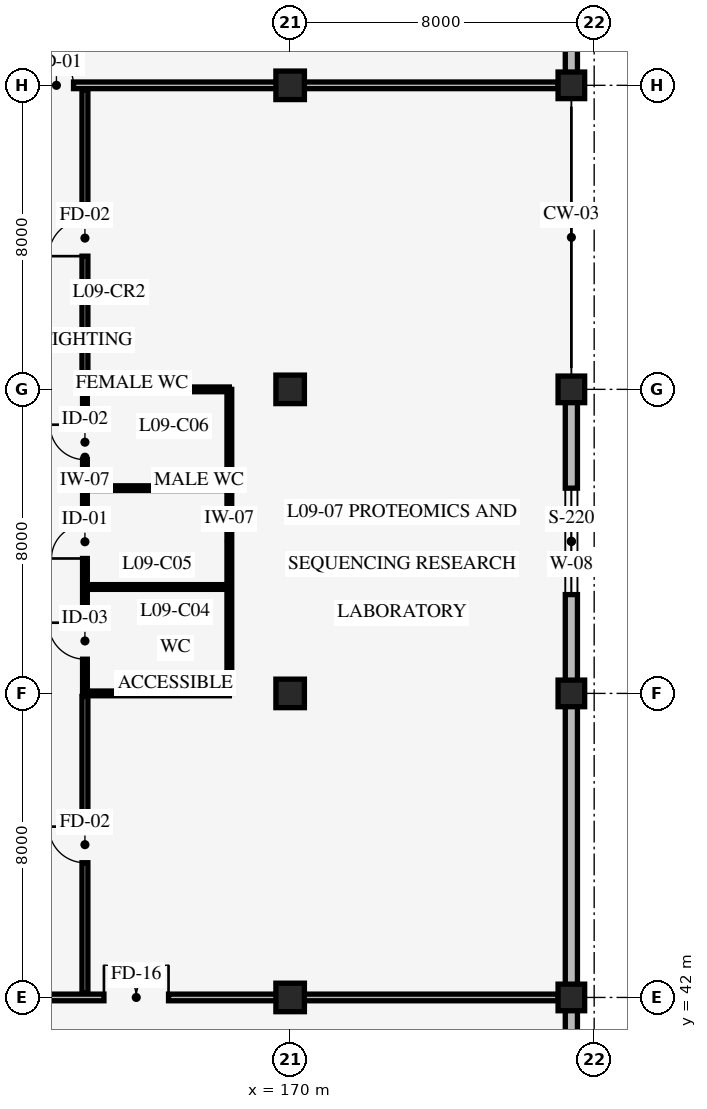
"""IFC4 building model, lengths in metres.
Left out: names, types, materials, properties, quantities, classifications, styles, units other than length and angle.
Written with IfcOpenShell. Run it as: python <this file> out.ifc"""

import sys

from ifc_helpers import new_model, si_unit, direction, frame, frame_2d, origin, origin_2d, place, context, subcontext, project, spatial, rectangle, extrude, element, fill, save


model = new_model("IFC4")
c1 = context("Model", 3, precision=1e-05, world=origin(), true_north=direction((0.0, 1.0)))
c2 = subcontext(c1, "Body", "Model", "MODEL_VIEW")
j1 = project(units=[si_unit("LENGTHUNIT", "METRE"), si_unit("PLANEANGLEUNIT", "RADIAN")], contexts=[c1])
p1 = place(None, origin())
s1 = spatial("IfcSite", under=j1, at=p1, CompositionType="ELEMENT")
p2 = place(p1, origin())
s2 = spatial("IfcBuilding", under=s1, at=p2, CompositionType="ELEMENT")
p3 = place(p2, frame((0.0, 0.0, 36.0)))
s3 = spatial("IfcBuildingStorey", under=s2, at=p3, CompositionType="ELEMENT", Elevation=36.0)
for number, where, z_axis, x_axis in (
    (1, (170.0, 42.0, 0.0), (0.0, 0.0, 1.0), (1.0, 0.0, 0.0)),
    (2, (170.0, 50.0, 0.0), (0.0, 0.0, 1.0), (1.0, 0.0, 0.0)),
    (3, (170.0, 58.0, 0.0), (0.0, 0.0, 1.0), (1.0, 0.0, 0.0)),
    (4, (170.0, 66.0, 0.0), (0.0, 0.0, 1.0), (1.0, 0.0, 0.0)),
):
    element("IfcColumn", number, at=place(p3, frame(where, z_axis=z_axis, x_axis=x_axis)), inside=s3, PredefinedType="COLUMN", context=c2, shape_type="SweptSolid", body=[
        extrude(rectangle(XDim=0.75, YDim=0.75, at=origin_2d()), origin(), (0.0, 0.0, 1.0), 4.2),
    ])
for number, where, z_axis, x_axis in (
    (5, (177.4, 42.0, 0.0), (0.0, 0.0, 1.0), (1.0, 0.0, 0.0)),
    (6, (177.4, 50.0, 0.0), (0.0, 0.0, 1.0), (1.0, 0.0, 0.0)),
    (7, (177.4, 58.0, 0.0), (0.0, 0.0, 1.0), (1.0, 0.0, 0.0)),
    (8, (177.4, 66.0, 0.0), (0.0, 0.0, 1.0), (1.0, 0.0, 0.0)),
):
    element("IfcColumn", number, at=place(p3, frame(where, z_axis=z_axis, x_axis=x_axis)), inside=s3, PredefinedType="COLUMN", context=c2, shape_type="SweptSolid", body=[
        extrude(rectangle(XDim=0.7, YDim=0.7, at=origin_2d()), origin(), (0.0, 0.0, 1.0), 4.2),
    ])
p4 = place(p3, frame((177.4, 74.0, 0.0), z_axis=(0.0, 0.0, 1.0), x_axis=(0.0, -1.0, 0.0)))
e9 = element("IfcWall", 9, at=p4, inside=s3, PredefinedType="STANDARD", context=c2, shape_type="SweptSolid", body=[
    extrude(rectangle(XDim=8.0, YDim=0.32, at=frame_2d((4.0, 0.0))), origin(), (0.0, 0.0, 1.0), 3.14),
])
p5 = place(p4, frame((2.5, 0.0, 0.85)))
e10 = element("IfcOpeningElement", 10, at=p5, cuts=e9, PredefinedType="OPENING", context=c2, shape_type="SweptSolid", body=[
    extrude(rectangle(XDim=3.0, YDim=1.8, at=frame_2d((1.5, 0.9))), frame((0.0, 0.17, 0.0), z_axis=(0.0, -1.0, 0.0), x_axis=(1.0, 0.0, 0.0)), (0.0, 0.0, 1.0), 0.34),
])
p6 = place(p3, frame((177.4, 58.0, 0.0), z_axis=(0.0, 0.0, 1.0), x_axis=(0.0, -1.0, 0.0)))
e11 = element("IfcWall", 11, at=p6, inside=s3, PredefinedType="STANDARD", context=c2, shape_type="SweptSolid", body=[
    extrude(rectangle(XDim=8.0, YDim=0.32, at=frame_2d((4.0, 0.0))), origin(), (0.0, 0.0, 1.0), 3.14),
])
p7 = place(p6, frame((2.6, 0.0, 0.85)))
e12 = element("IfcOpeningElement", 12, at=p7, cuts=e11, PredefinedType="OPENING", context=c2, shape_type="SweptSolid", body=[
    extrude(rectangle(XDim=2.8, YDim=1.6, at=frame_2d((1.4, 0.8))), frame((0.0, 0.17, 0.0), z_axis=(0.0, -1.0, 0.0), x_axis=(1.0, 0.0, 0.0)), (0.0, 0.0, 1.0), 0.34),
])
p8 = place(p3, frame((177.4, 50.0, 0.0), z_axis=(0.0, 0.0, 1.0), x_axis=(0.0, -1.0, 0.0)))
e13 = element("IfcWall", 13, at=p8, inside=s3, PredefinedType="STANDARD", context=c2, shape_type="SweptSolid", body=[
    extrude(rectangle(XDim=8.0, YDim=0.32, at=frame_2d((4.0, 0.0))), origin(), (0.0, 0.0, 1.0), 3.14),
])
p9 = place(p3, frame((177.4, 42.0, 0.0), z_axis=(0.0, 0.0, 1.0), x_axis=(0.0, -1.0, 0.0)))
e14 = element("IfcWall", 14, at=p9, inside=s3, PredefinedType="STANDARD", context=c2, shape_type="SweptSolid", body=[
    extrude(rectangle(XDim=8.0, YDim=0.32, at=frame_2d((4.0, 0.0))), origin(), (0.0, 0.0, 1.0), 3.14),
])
p10 = place(p9, frame((2.7, 0.0, 0.85)))
e15 = element("IfcOpeningElement", 15, at=p10, cuts=e14, PredefinedType="OPENING", context=c2, shape_type="SweptSolid", body=[
    extrude(rectangle(XDim=2.6, YDim=1.5, at=frame_2d((1.3, 0.75))), frame((0.0, 0.17, 0.0), z_axis=(0.0, -1.0, 0.0), x_axis=(1.0, 0.0, 0.0)), (0.0, 0.0, 1.0), 0.34),
])
p11 = place(p3, frame((164.6, 50.0, 0.0), z_axis=(0.0, 0.0, 1.0), x_axis=(0.0, 1.0, 0.0)))
e16 = element("IfcWall", 16, at=p11, inside=s3, PredefinedType="STANDARD", context=c2, shape_type="SweptSolid", body=[
    extrude(rectangle(XDim=8.0, YDim=0.125, at=frame_2d((4.0, 0.0))), origin(), (0.0, 0.0, 1.0), 3.9),
])
p12 = place(p11, frame((0.9, 0.0, 0.0)))
e17 = element("IfcOpeningElement", 17, at=p12, cuts=e16, PredefinedType="OPENING", context=c2, shape_type="SweptSolid", body=[
    extrude(rectangle(XDim=0.96, YDim=2.08, at=frame_2d((0.48, 1.04))), frame((0.0, 0.073, 0.0), z_axis=(0.0, -1.0, 0.0), x_axis=(1.0, 0.0, 0.0)), (0.0, 0.0, 1.0), 0.145),
])
p13 = place(p11, frame((3.55, 0.0, 0.0)))
e18 = element("IfcOpeningElement", 18, at=p13, cuts=e16, PredefinedType="OPENING", context=c2, shape_type="SweptSolid", body=[
    extrude(rectangle(XDim=0.88, YDim=2.05, at=frame_2d((0.44, 1.025))), frame((0.0, 0.073, 0.0), z_axis=(0.0, -1.0, 0.0), x_axis=(1.0, 0.0, 0.0)), (0.0, 0.0, 1.0), 0.145),
])
p14 = place(p11, frame((6.15, 0.0, 0.0)))
e19 = element("IfcOpeningElement", 19, at=p14, cuts=e16, PredefinedType="OPENING", context=c2, shape_type="SweptSolid", body=[
    extrude(rectangle(XDim=0.92, YDim=2.05, at=frame_2d((0.46, 1.025))), frame((0.0, 0.073, 0.0), z_axis=(0.0, -1.0, 0.0), x_axis=(1.0, 0.0, 0.0)), (0.0, 0.0, 1.0), 0.145),
])
p15 = place(p3, frame((168.4, 50.0, 0.0), z_axis=(0.0, 0.0, 1.0), x_axis=(0.0, 1.0, 0.0)))
e20 = element("IfcWall", 20, at=p15, inside=s3, PredefinedType="STANDARD", context=c2, shape_type="SweptSolid", body=[
    extrude(rectangle(XDim=8.0, YDim=0.125, at=frame_2d((4.0, 0.0))), origin(), (0.0, 0.0, 1.0), 3.9),
])
p16 = place(p3, frame((164.6, 50.0, 0.0), z_axis=(0.0, 0.0, 1.0), x_axis=(1.0, 0.0, 0.0)))
e21 = element("IfcWall", 21, at=p16, inside=s3, PredefinedType="STANDARD", context=c2, shape_type="SweptSolid", body=[
    extrude(rectangle(XDim=3.8, YDim=0.125, at=frame_2d((1.9, 0.0))), origin(), (0.0, 0.0, 1.0), 3.09),
])
for number, where, z_axis, x_axis in (
    (22, (164.6, 52.8, 0.0), (0.0, 0.0, 1.0), (1.0, 0.0, 0.0)),
    (23, (164.6, 55.4, 0.0), (0.0, 0.0, 1.0), (1.0, 0.0, 0.0)),
):
    element("IfcWall", number, at=place(p3, frame(where, z_axis=z_axis, x_axis=x_axis)), inside=s3, PredefinedType="STANDARD", context=c2, shape_type="SweptSolid", body=[
        extrude(rectangle(XDim=3.8, YDim=0.125, at=frame_2d((1.9, 0.0))), origin(), (0.0, 0.0, 1.0), 3.9),
    ])
p17 = place(p3, frame((164.6, 58.0, 0.0), z_axis=(0.0, 0.0, 1.0), x_axis=(1.0, 0.0, 0.0)))
e24 = element("IfcWall", 24, at=p17, inside=s3, PredefinedType="STANDARD", context=c2, shape_type="SweptSolid", body=[
    extrude(rectangle(XDim=3.8, YDim=0.125, at=frame_2d((1.9, 0.0))), origin(), (0.0, 0.0, 1.0), 3.09),
])
p18 = place(p3, frame((164.6, 42.12, 0.0), z_axis=(0.0, 0.0, 1.0), x_axis=(0.0, 1.0, 0.0)))
e25 = element("IfcWall", 25, at=p18, inside=s3, PredefinedType="STANDARD", context=c2, shape_type="SweptSolid", body=[
    extrude(rectangle(XDim=7.8, YDim=0.155, at=frame_2d((3.9, 0.0))), origin(), (0.0, 0.0, 1.0), 3.9),
])
p19 = place(p18, frame((3.425, 0.0, 0.0)))
e26 = element("IfcOpeningElement", 26, at=p19, cuts=e25, PredefinedType="OPENING", context=c2, shape_type="SweptSolid", body=[
    extrude(rectangle(XDim=0.95, YDim=2.1, at=frame_2d((0.475, 1.05))), frame((0.0, 0.087, 0.0), z_axis=(0.0, -1.0, 0.0), x_axis=(1.0, 0.0, 0.0)), (0.0, 0.0, 1.0), 0.175),
])
p20 = place(p3, frame((164.6, 58.08, 0.0), z_axis=(0.0, 0.0, 1.0), x_axis=(0.0, 1.0, 0.0)))
e27 = element("IfcWall", 27, at=p20, inside=s3, PredefinedType="STANDARD", context=c2, shape_type="SweptSolid", body=[
    extrude(rectangle(XDim=7.8, YDim=0.155, at=frame_2d((3.9, 0.0))), origin(), (0.0, 0.0, 1.0), 3.9),
])
p21 = place(p20, frame((3.425, 0.0, 0.0)))
e28 = element("IfcOpeningElement", 28, at=p21, cuts=e27, PredefinedType="OPENING", context=c2, shape_type="SweptSolid", body=[
    extrude(rectangle(XDim=0.95, YDim=2.1, at=frame_2d((0.475, 1.05))), frame((0.0, 0.087, 0.0), z_axis=(0.0, -1.0, 0.0), x_axis=(1.0, 0.0, 0.0)), (0.0, 0.0, 1.0), 0.175),
])
p22 = place(p3, frame((162.35, 42.0, 0.0), z_axis=(0.0, 0.0, 1.0), x_axis=(1.0, 0.0, 0.0)))
e29 = element("IfcWall", 29, at=p22, inside=s3, PredefinedType="STANDARD", context=c2, shape_type="SweptSolid", body=[
    extrude(rectangle(XDim=14.7, YDim=0.175, at=frame_2d((7.35, 0.0))), origin(), (0.0, 0.0, 1.0), 3.09),
])
p23 = place(p22, frame((2.75, 0.0, 0.0)))
e30 = element("IfcOpeningElement", 30, at=p23, cuts=e29, PredefinedType="OPENING", context=c2, shape_type="SweptSolid", body=[
    extrude(rectangle(XDim=1.7, YDim=2.3, at=frame_2d((0.85, 1.15))), frame((0.0, 0.098, 0.0), z_axis=(0.0, -1.0, 0.0), x_axis=(1.0, 0.0, 0.0)), (0.0, 0.0, 1.0), 0.195),
])
p24 = place(p3, frame((162.35, 66.0, 0.0), z_axis=(0.0, 0.0, 1.0), x_axis=(1.0, 0.0, 0.0)))
e31 = element("IfcWall", 31, at=p24, inside=s3, PredefinedType="STANDARD", context=c2, shape_type="SweptSolid", body=[
    extrude(rectangle(XDim=14.7, YDim=0.175, at=frame_2d((7.35, 0.0))), origin(), (0.0, 0.0, 1.0), 3.09),
])
p25 = place(p24, frame((1.05, 0.0, 0.0)))
e32 = element("IfcOpeningElement", 32, at=p25, cuts=e31, PredefinedType="OPENING", context=c2, shape_type="SweptSolid", body=[
    extrude(rectangle(XDim=0.9, YDim=2.1, at=frame_2d((0.45, 1.05))), frame((0.0, 0.098, 0.0), z_axis=(0.0, -1.0, 0.0), x_axis=(1.0, 0.0, 0.0)), (0.0, 0.0, 1.0), 0.195),
])
p26 = place(p7, origin())
e33 = element("IfcWindow", 33, at=p26, inside=s3, PartitioningType="SINGLE_PANEL", PredefinedType="WINDOW", context=c2, shape_type="SweptSolid", body=[
    extrude(rectangle(XDim=2.8, YDim=1.6, at=frame_2d((1.4, 0.8))), frame((0.0, 0.03, 0.0), z_axis=(0.0, -1.0, 0.0), x_axis=(1.0, 0.0, 0.0)), (0.0, 0.0, 1.0), 0.06),
])
fill(e12, e33)
p27 = place(p12, origin())
e34 = element("IfcDoor", 34, at=p27, inside=s3, OperationType="SINGLE_SWING_RIGHT", PredefinedType="DOOR", context=c2, shape_type="SweptSolid", body=[
    extrude(rectangle(XDim=0.96, YDim=2.08, at=frame_2d((0.48, 1.04))), frame((0.0, 0.025, 0.0), z_axis=(0.0, -1.0, 0.0), x_axis=(1.0, 0.0, 0.0)), (0.0, 0.0, 1.0), 0.05),
])
fill(e17, e34)
p28 = place(p13, origin())
e35 = element("IfcDoor", 35, at=p28, inside=s3, OperationType="SINGLE_SWING_LEFT", PredefinedType="DOOR", context=c2, shape_type="SweptSolid", body=[
    extrude(rectangle(XDim=0.88, YDim=2.05, at=frame_2d((0.44, 1.025))), frame((0.0, 0.025, 0.0), z_axis=(0.0, -1.0, 0.0), x_axis=(1.0, 0.0, 0.0)), (0.0, 0.0, 1.0), 0.05),
])
fill(e18, e35)
p29 = place(p14, origin())
e36 = element("IfcDoor", 36, at=p29, inside=s3, OperationType="SINGLE_SWING_RIGHT", PredefinedType="DOOR", context=c2, shape_type="SweptSolid", body=[
    extrude(rectangle(XDim=0.92, YDim=2.05, at=frame_2d((0.46, 1.025))), frame((0.0, 0.025, 0.0), z_axis=(0.0, -1.0, 0.0), x_axis=(1.0, 0.0, 0.0)), (0.0, 0.0, 1.0), 0.05),
])
fill(e19, e36)
p30 = place(p19, origin())
e37 = element("IfcDoor", 37, at=p30, inside=s3, OperationType="SINGLE_SWING_RIGHT", PredefinedType="DOOR", context=c2, shape_type="SweptSolid", body=[
    extrude(rectangle(XDim=0.95, YDim=2.1, at=frame_2d((0.475, 1.05))), frame((0.0, 0.025, 0.0), z_axis=(0.0, -1.0, 0.0), x_axis=(1.0, 0.0, 0.0)), (0.0, 0.0, 1.0), 0.05),
])
fill(e26, e37)
p31 = place(p21, origin())
e38 = element("IfcDoor", 38, at=p31, inside=s3, OperationType="SINGLE_SWING_LEFT", PredefinedType="DOOR", context=c2, shape_type="SweptSolid", body=[
    extrude(rectangle(XDim=0.95, YDim=2.1, at=frame_2d((0.475, 1.05))), frame((0.0, 0.025, 0.0), z_axis=(0.0, -1.0, 0.0), x_axis=(1.0, 0.0, 0.0)), (0.0, 0.0, 1.0), 0.05),
])
fill(e28, e38)
p32 = place(p23, origin())
e39 = element("IfcDoor", 39, at=p32, inside=s3, OperationType="DOUBLE_DOOR_SINGLE_SWING", PredefinedType="DOOR", context=c2, shape_type="SweptSolid", body=[
    extrude(rectangle(XDim=1.7, YDim=2.3, at=frame_2d((0.85, 1.15))), frame((0.0, 0.025, 0.0), z_axis=(0.0, -1.0, 0.0), x_axis=(1.0, 0.0, 0.0)), (0.0, 0.0, 1.0), 0.05),
])
fill(e30, e39)
p33 = place(p25, origin())
e40 = element("IfcDoor", 40, at=p33, inside=s3, OperationType="SINGLE_SWING_LEFT", PredefinedType="DOOR", context=c2, shape_type="SweptSolid", body=[
    extrude(rectangle(XDim=0.9, YDim=2.1, at=frame_2d((0.45, 1.05))), frame((0.0, 0.025, 0.0), z_axis=(0.0, -1.0, 0.0), x_axis=(1.0, 0.0, 0.0)), (0.0, 0.0, 1.0), 0.05),
])
fill(e32, e40)
save(model, sys.argv[1])
